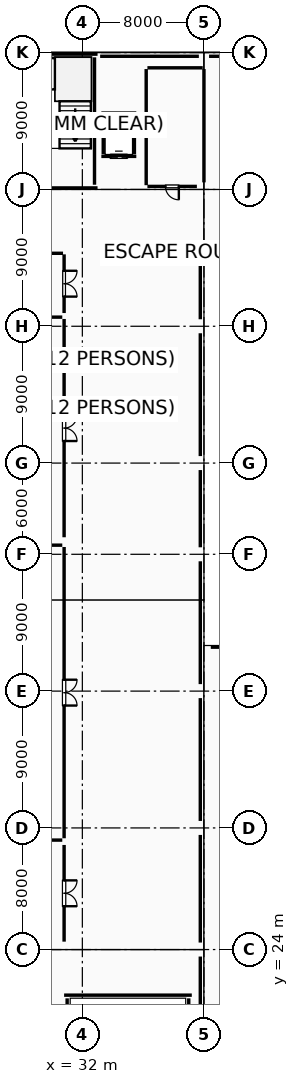
"""IFC4 building model, lengths in metres.
Left out: names, types, materials, properties, quantities, classifications, styles, units other than length and angle.
Written with IfcOpenShell. Run it as: python <this file> out.ifc"""

import sys

from ifc_helpers import new_model, si_unit, direction, frame, frame_2d, origin, origin_2d, place, context, subcontext, project, spatial, rectangle, i_section, extrude, element, fill, save


model = new_model("IFC4")
c1 = context("Model", 3, precision=1e-05, world=origin(), true_north=direction((0.0, 1.0)))
c2 = subcontext(c1, "Body", "Model", "MODEL_VIEW")
j1 = project(units=[si_unit("LENGTHUNIT", "METRE"), si_unit("PLANEANGLEUNIT", "RADIAN")], contexts=[c1])
p1 = place(None, origin())
s1 = spatial("IfcSite", under=j1, at=p1, CompositionType="ELEMENT")
p2 = place(p1, origin())
s2 = spatial("IfcBuilding", under=s1, at=p2, CompositionType="ELEMENT")
p3 = place(p2, frame((0.0, 0.0, 19.8)))
s3 = spatial("IfcBuildingStorey", under=s2, at=p3, CompositionType="ELEMENT", Elevation=19.8)
for number, where, z_axis, x_axis in (
    (1, (32.0, 24.0, 0.0), (0.0, 0.0, 1.0), (1.0, 0.0, 0.0)),
    (2, (32.0, 50.0, 0.0), (0.0, 0.0, 1.0), (1.0, 0.0, 0.0)),
    (3, (32.0, 56.0, 0.0), (0.0, 0.0, 1.0), (1.0, 0.0, 0.0)),
    (4, (32.0, 65.0, 0.0), (0.0, 0.0, 1.0), (1.0, 0.0, 0.0)),
):
    element("IfcColumn", number, at=place(p3, frame(where, z_axis=z_axis, x_axis=x_axis)), inside=s3, PredefinedType="COLUMN", context=c2, shape_type="SweptSolid", body=[
        extrude(rectangle(XDim=0.75, YDim=0.75, at=origin_2d()), origin(), (0.0, 0.0, 1.0), 4.5),
    ])
for number, where, z_axis, x_axis in (
    (5, (40.0, 24.0, 0.0), (0.0, 0.0, 1.0), (1.0, 0.0, 0.0)),
    (6, (40.0, 32.0, 0.0), (0.0, 0.0, 1.0), (1.0, 0.0, 0.0)),
    (7, (40.0, 41.0, 0.0), (0.0, 0.0, 1.0), (1.0, 0.0, 0.0)),
    (8, (40.0, 50.0, 0.0), (0.0, 0.0, 1.0), (1.0, 0.0, 0.0)),
    (9, (40.0, 56.0, 0.0), (0.0, 0.0, 1.0), (1.0, 0.0, 0.0)),
    (10, (40.0, 65.0, 0.0), (0.0, 0.0, 1.0), (1.0, 0.0, 0.0)),
):
    element("IfcColumn", number, at=place(p3, frame(where, z_axis=z_axis, x_axis=x_axis)), inside=s3, PredefinedType="COLUMN", context=c2, shape_type="SweptSolid", body=[
        extrude(rectangle(XDim=0.9, YDim=0.9, at=origin_2d()), origin(), (0.0, 0.0, 1.0), 4.5),
    ])
p4 = place(p3, frame((40.0, 74.0, 0.0), z_axis=(0.0, 0.0, 1.0), x_axis=(1.0, 0.0, 0.0)))
e11 = element("IfcColumn", 11, at=p4, inside=s3, PredefinedType="COLUMN", context=c2, shape_type="SweptSolid", body=[
    extrude(rectangle(XDim=0.9, YDim=0.9, at=origin_2d()), origin(), (0.0, 0.0, 1.0), 4.46),
])
p5 = place(p3, frame((40.0, 83.0, 0.0), z_axis=(0.0, 0.0, 1.0), x_axis=(1.0, 0.0, 0.0)))
e12 = element("IfcColumn", 12, at=p5, inside=s3, PredefinedType="COLUMN", context=c2, shape_type="SweptSolid", body=[
    extrude(rectangle(XDim=0.65, YDim=0.65, at=origin_2d()), origin(), (0.0, 0.0, 1.0), 4.5),
])
p6 = place(p3, frame((30.28, 79.88, 0.0), z_axis=(0.0, 0.0, 1.0), x_axis=(1.0, 0.0, 0.0)))
e13 = element("IfcColumn", 13, at=p6, inside=s3, PredefinedType="COLUMN", context=c2, shape_type="SweptSolid", body=[
    extrude(i_section(OverallWidth=0.25, OverallDepth=0.35, WebThickness=0.01, FlangeThickness=0.012, FilletRadius=0.012, at=origin_2d()), origin(), (0.0, 0.0, 1.0), 4.46),
])
p7 = place(p3, frame((33.17, 82.76, 0.0), z_axis=(0.0, 0.0, 1.0), x_axis=(1.0, 0.0, 0.0)))
e14 = element("IfcWall", 14, at=p7, inside=s3, PredefinedType="PARAPET", context=c2, shape_type="SweptSolid", body=[
    extrude(rectangle(XDim=6.495, YDim=0.18, at=frame_2d((3.248, 0.0))), origin(), (0.0, 0.0, 1.0), 0.88),
])
p8 = place(p3, frame((40.335, 82.76, 0.0), z_axis=(0.0, 0.0, 1.0), x_axis=(1.0, 0.0, 0.0)))
e15 = element("IfcWall", 15, at=p8, inside=s3, PredefinedType="PARAPET", context=c2, shape_type="SweptSolid", body=[
    extrude(rectangle(XDim=7.33, YDim=0.18, at=frame_2d((3.665, 0.0))), origin(), (0.0, 0.0, 1.0), 0.88),
])
p9 = place(p3, frame((39.76, 69.88, 0.0), z_axis=(0.0, 0.0, 1.0), x_axis=(0.0, -1.0, 0.0)))
e16 = element("IfcWall", 16, at=p9, inside=s3, PredefinedType="PARAPET", context=c2, shape_type="SweptSolid", body=[
    extrude(rectangle(XDim=4.42, YDim=0.18, at=frame_2d((2.21, 0.0))), origin(), (0.0, 0.0, 1.0), 0.88),
])
p10 = place(p3, frame((39.76, 64.54, 0.0), z_axis=(0.0, 0.0, 1.0), x_axis=(0.0, -1.0, 0.0)))
e17 = element("IfcWall", 17, at=p10, inside=s3, PredefinedType="PARAPET", context=c2, shape_type="SweptSolid", body=[
    extrude(rectangle(XDim=8.08, YDim=0.18, at=frame_2d((4.04, 0.0))), origin(), (0.0, 0.0, 1.0), 0.88),
])
p11 = place(p3, frame((39.76, 55.54, 0.0), z_axis=(0.0, 0.0, 1.0), x_axis=(0.0, -1.0, 0.0)))
e18 = element("IfcWall", 18, at=p11, inside=s3, PredefinedType="PARAPET", context=c2, shape_type="SweptSolid", body=[
    extrude(rectangle(XDim=5.08, YDim=0.18, at=frame_2d((2.54, 0.0))), origin(), (0.0, 0.0, 1.0), 0.88),
])
for number, where, z_axis, x_axis in (
    (19, (39.76, 49.54, 0.0), (0.0, 0.0, 1.0), (0.0, -1.0, 0.0)),
    (20, (39.76, 40.54, 0.0), (0.0, 0.0, 1.0), (0.0, -1.0, 0.0)),
):
    element("IfcWall", number, at=place(p3, frame(where, z_axis=z_axis, x_axis=x_axis)), inside=s3, PredefinedType="PARAPET", context=c2, shape_type="SweptSolid", body=[
        extrude(rectangle(XDim=8.08, YDim=0.18, at=frame_2d((4.04, 0.0))), origin(), (0.0, 0.0, 1.0), 0.88),
    ])
for number, where, z_axis, x_axis in (
    (21, (39.76, 31.54, 0.0), (0.0, 0.0, 1.0), (0.0, -1.0, 0.0)),
    (22, (39.76, 23.54, 0.0), (0.0, 0.0, 1.0), (0.0, -1.0, 0.0)),
):
    element("IfcWall", number, at=place(p3, frame(where, z_axis=z_axis, x_axis=x_axis)), inside=s3, PredefinedType="PARAPET", context=c2, shape_type="SweptSolid", body=[
        extrude(rectangle(XDim=7.08, YDim=0.18, at=frame_2d((3.54, 0.0))), origin(), (0.0, 0.0, 1.0), 0.88),
    ])
p12 = place(p3, frame((40.45, 43.89, 0.0), z_axis=(0.0, 0.0, 1.0), x_axis=(1.0, 0.0, 0.0)))
e23 = element("IfcWall", 23, at=p12, inside=s3, PredefinedType="PARAPET", context=c2, shape_type="SweptSolid", body=[
    extrude(rectangle(XDim=23.1, YDim=0.18, at=frame_2d((11.55, 0.0))), origin(), (0.0, 0.0, 1.0), 1.15),
])
p13 = place(p3, frame((39.2, 21.0, 0.0), z_axis=(0.0, 0.0, 1.0), x_axis=(-1.0, 0.0, 0.0)))
e24 = element("IfcWall", 24, at=p13, inside=s3, PredefinedType="SHEAR", context=c2, shape_type="SweptSolid", body=[
    extrude(rectangle(XDim=8.4, YDim=0.4, at=frame_2d((4.2, 0.0))), origin(), (0.0, 0.0, 1.0), 4.28),
])
for number, where, z_axis, x_axis in (
    (25, (39.0, 12.41, 0.0), (0.0, 0.0, 1.0), (0.0, 1.0, 0.0)),
    (26, (31.0, 20.79, 0.0), (0.0, 0.0, 1.0), (0.0, -1.0, 0.0)),
):
    element("IfcWall", number, at=place(p3, frame(where, z_axis=z_axis, x_axis=x_axis)), inside=s3, PredefinedType="SHEAR", context=c2, shape_type="SweptSolid", body=[
        extrude(rectangle(XDim=8.38, YDim=0.4, at=frame_2d((4.19, 0.0))), origin(), (0.0, 0.0, 1.0), 4.28),
    ])
p14 = place(p3, frame((24.374, 74.1, 0.0), z_axis=(0.0, 0.0, 1.0), x_axis=(1.0, 0.0, 0.0)))
e27 = element("IfcWall", 27, at=p14, inside=s3, PredefinedType="SHEAR", context=c2, shape_type="SweptSolid", body=[
    extrude(rectangle(XDim=8.626, YDim=0.4, at=frame_2d((4.313, 0.0))), origin(), (0.0, 0.0, 1.0), 4.25),
])
p15 = place(p14, frame((3.776, 0.0, 0.0)))
e28 = element("IfcOpeningElement", 28, at=p15, cuts=e27, PredefinedType="OPENING", context=c2, shape_type="SweptSolid", body=[
    extrude(rectangle(XDim=1.3, YDim=2.15, at=frame_2d((0.65, 1.075))), frame((0.0, 0.21, 0.0), z_axis=(0.0, -1.0, 0.0), x_axis=(1.0, 0.0, 0.0)), (0.0, 0.0, 1.0), 0.42),
])
p16 = place(p3, frame((33.0, 82.9, 0.0), z_axis=(0.0, 0.0, 1.0), x_axis=(-1.0, 0.0, 0.0)))
e29 = element("IfcWall", 29, at=p16, inside=s3, PredefinedType="SHEAR", context=c2, shape_type="SweptSolid", body=[
    extrude(rectangle(XDim=8.676, YDim=0.4, at=frame_2d((4.338, 0.0))), origin(), (0.0, 0.0, 1.0), 4.25),
])
p17 = place(p3, frame((32.8, 74.31, 0.0), z_axis=(0.0, 0.0, 1.0), x_axis=(0.0, 1.0, 0.0)))
e30 = element("IfcWall", 30, at=p17, inside=s3, PredefinedType="SHEAR", context=c2, shape_type="SweptSolid", body=[
    extrude(rectangle(XDim=8.38, YDim=0.4, at=frame_2d((4.19, 0.0))), origin(), (0.0, 0.0, 1.0), 4.25),
])
p18 = place(p3, frame((33.25, 76.175, 0.0), z_axis=(0.0, 0.0, 1.0), x_axis=(1.0, 0.0, 0.0)))
e31 = element("IfcWall", 31, at=p18, inside=s3, PredefinedType="STANDARD", context=c2, shape_type="SweptSolid", body=[
    extrude(rectangle(XDim=2.3, YDim=0.25, at=frame_2d((1.15, 0.0))), origin(), (0.0, 0.0, 1.0), 4.24),
])
p19 = place(p18, frame((0.6, 0.0, 0.0)))
e32 = element("IfcOpeningElement", 32, at=p19, cuts=e31, PredefinedType="OPENING", context=c2, shape_type="SweptSolid", body=[
    extrude(rectangle(XDim=1.1, YDim=2.15, at=frame_2d((0.55, 1.075))), frame((0.0, 0.135, 0.0), z_axis=(0.0, -1.0, 0.0), x_axis=(1.0, 0.0, 0.0)), (0.0, 0.0, 1.0), 0.27),
])
p20 = place(p3, frame((35.55, 79.025, 0.0), z_axis=(0.0, 0.0, 1.0), x_axis=(-1.0, 0.0, 0.0)))
e33 = element("IfcWall", 33, at=p20, inside=s3, PredefinedType="STANDARD", context=c2, shape_type="SweptSolid", body=[
    extrude(rectangle(XDim=2.3, YDim=0.25, at=frame_2d((1.15, 0.0))), origin(), (0.0, 0.0, 1.0), 4.24),
])
for number, where, z_axis, x_axis in (
    (34, (35.425, 76.31, 0.0), (0.0, 0.0, 1.0), (0.0, 1.0, 0.0)),
    (35, (33.375, 78.89, 0.0), (0.0, 0.0, 1.0), (0.0, -1.0, 0.0)),
):
    element("IfcWall", number, at=place(p3, frame(where, z_axis=z_axis, x_axis=x_axis)), inside=s3, PredefinedType="STANDARD", context=c2, shape_type="SweptSolid", body=[
        extrude(rectangle(XDim=2.58, YDim=0.25, at=frame_2d((1.29, 0.0))), origin(), (0.0, 0.0, 1.0), 4.24),
    ])
p21 = place(p3, frame((16.344, 50.6, 0.0), z_axis=(0.0, 0.0, 1.0), x_axis=(1.0, 0.0, 0.0)))
e36 = element("IfcWall", 36, at=p21, inside=s3, PredefinedType="PARTITIONING", context=c2, shape_type="SweptSolid", body=[
    extrude(rectangle(XDim=14.336, YDim=0.2, at=frame_2d((7.168, 0.0))), origin(), (0.0, 0.0, 1.0), 4.5),
])
p22 = place(p3, frame((30.8, 50.48, 0.0), z_axis=(0.0, 0.0, 1.0), x_axis=(0.0, -1.0, 0.0)))
e37 = element("IfcWall", 37, at=p22, inside=s3, PredefinedType="PARTITIONING", context=c2, shape_type="SweptSolid", body=[
    extrude(rectangle(XDim=19.16, YDim=0.2, at=frame_2d((9.58, 0.0))), origin(), (0.0, 0.0, 1.0), 4.5),
])
p23 = place(p22, frame((8.73, 0.0, 0.0)))
e38 = element("IfcOpeningElement", 38, at=p23, cuts=e37, PredefinedType="OPENING", context=c2, shape_type="SweptSolid", body=[
    extrude(rectangle(XDim=1.7, YDim=2.25, at=frame_2d((0.85, 1.125))), frame((0.0, 0.11, 0.0), z_axis=(0.0, -1.0, 0.0), x_axis=(1.0, 0.0, 0.0)), (0.0, 0.0, 1.0), 0.22),
])
p24 = place(p3, frame((30.68, 31.2, 0.0), z_axis=(0.0, 0.0, 1.0), x_axis=(-1.0, 0.0, 0.0)))
e39 = element("IfcWall", 39, at=p24, inside=s3, PredefinedType="PARTITIONING", context=c2, shape_type="SweptSolid", body=[
    extrude(rectangle(XDim=14.336, YDim=0.2, at=frame_2d((7.168, 0.0))), origin(), (0.0, 0.0, 1.0), 4.5),
])
p25 = place(p24, frame((6.23, 0.0, 0.0)))
e40 = element("IfcOpeningElement", 40, at=p25, cuts=e39, PredefinedType="OPENING", context=c2, shape_type="SweptSolid", body=[
    extrude(rectangle(XDim=1.7, YDim=2.25, at=frame_2d((0.85, 1.125))), frame((0.0, 0.11, 0.0), z_axis=(0.0, -1.0, 0.0), x_axis=(1.0, 0.0, 0.0)), (0.0, 0.0, 1.0), 0.22),
])
p26 = place(p3, frame((16.344, 65.6, 0.0), z_axis=(0.0, 0.0, 1.0), x_axis=(1.0, 0.0, 0.0)))
e41 = element("IfcWall", 41, at=p26, inside=s3, PredefinedType="PARTITIONING", context=c2, shape_type="SweptSolid", body=[
    extrude(rectangle(XDim=14.336, YDim=0.2, at=frame_2d((7.168, 0.0))), origin(), (0.0, 0.0, 1.0), 4.24),
])
p27 = place(p26, frame((4.642, 0.0, 0.0)))
e42 = element("IfcOpeningElement", 42, at=p27, cuts=e41, PredefinedType="OPENING", context=c2, shape_type="SweptSolid", body=[
    extrude(rectangle(XDim=1.4, YDim=2.15, at=frame_2d((0.7, 1.075))), frame((0.0, 0.11, 0.0), z_axis=(0.0, -1.0, 0.0), x_axis=(1.0, 0.0, 0.0)), (0.0, 0.0, 1.0), 0.22),
])
p28 = place(p26, frame((8.275, 0.0, 0.0)))
e43 = element("IfcOpeningElement", 43, at=p28, cuts=e41, PredefinedType="OPENING", context=c2, shape_type="SweptSolid", body=[
    extrude(rectangle(XDim=1.7, YDim=2.25, at=frame_2d((0.85, 1.125))), frame((0.0, 0.11, 0.0), z_axis=(0.0, -1.0, 0.0), x_axis=(1.0, 0.0, 0.0)), (0.0, 0.0, 1.0), 0.22),
])
p29 = place(p3, frame((30.8, 65.48, 0.0), z_axis=(0.0, 0.0, 1.0), x_axis=(0.0, -1.0, 0.0)))
e44 = element("IfcWall", 44, at=p29, inside=s3, PredefinedType="PARTITIONING", context=c2, shape_type="SweptSolid", body=[
    extrude(rectangle(XDim=14.36, YDim=0.2, at=frame_2d((7.18, 0.0))), origin(), (0.0, 0.0, 1.0), 4.24),
])
p30 = place(p29, frame((6.33, 0.0, 0.0)))
e45 = element("IfcOpeningElement", 45, at=p30, cuts=e44, PredefinedType="OPENING", context=c2, shape_type="SweptSolid", body=[
    extrude(rectangle(XDim=1.7, YDim=2.25, at=frame_2d((0.85, 1.125))), frame((0.0, 0.11, 0.0), z_axis=(0.0, -1.0, 0.0), x_axis=(1.0, 0.0, 0.0)), (0.0, 0.0, 1.0), 0.22),
])
p31 = place(p3, frame((23.67, 69.8, 0.0), z_axis=(0.0, 0.0, 1.0), x_axis=(1.0, 0.0, 0.0)))
e46 = element("IfcWall", 46, at=p31, inside=s3, PredefinedType="PARTITIONING", context=c2, shape_type="SweptSolid", body=[
    extrude(rectangle(XDim=7.06, YDim=0.1, at=frame_2d((3.53, 0.0))), origin(), (0.0, 0.0, 1.0), 4.24),
])
p32 = place(p3, frame((30.8, 69.73, 0.0), z_axis=(0.0, 0.0, 1.0), x_axis=(0.0, -1.0, 0.0)))
e47 = element("IfcWall", 47, at=p32, inside=s3, PredefinedType="PARTITIONING", context=c2, shape_type="SweptSolid", body=[
    extrude(rectangle(XDim=3.86, YDim=0.1, at=frame_2d((1.93, 0.0))), origin(), (0.0, 0.0, 1.0), 4.24),
])
p33 = place(p32, frame((1.08, 0.0, 0.0)))
e48 = element("IfcOpeningElement", 48, at=p33, cuts=e47, PredefinedType="OPENING", context=c2, shape_type="SweptSolid", body=[
    extrude(rectangle(XDim=1.7, YDim=2.25, at=frame_2d((0.85, 1.125))), frame((0.0, 0.06, 0.0), z_axis=(0.0, -1.0, 0.0), x_axis=(1.0, 0.0, 0.0)), (0.0, 0.0, 1.0), 0.12),
])
p34 = place(p3, frame((30.8, 30.88, 0.0), z_axis=(0.0, 0.0, 1.0), x_axis=(0.0, -1.0, 0.0)))
e49 = element("IfcWall", 49, at=p34, inside=s3, PredefinedType="PARTITIONING", context=c2, shape_type="SweptSolid", body=[
    extrude(rectangle(XDim=6.36, YDim=0.2, at=frame_2d((3.18, 0.0))), origin(), (0.0, 0.0, 1.0), 4.5),
])
p35 = place(p34, frame((2.33, 0.0, 0.0)))
e50 = element("IfcOpeningElement", 50, at=p35, cuts=e49, PredefinedType="OPENING", context=c2, shape_type="SweptSolid", body=[
    extrude(rectangle(XDim=1.7, YDim=2.25, at=frame_2d((0.85, 1.125))), frame((0.0, 0.11, 0.0), z_axis=(0.0, -1.0, 0.0), x_axis=(1.0, 0.0, 0.0)), (0.0, 0.0, 1.0), 0.22),
])
p36 = place(p3, frame((40.0, 81.92, 0.0), z_axis=(0.0, 0.0, 1.0), x_axis=(0.0, -1.0, 0.0)))
e51 = element("IfcWall", 51, at=p36, inside=s3, PredefinedType="PARTITIONING", context=c2, shape_type="SweptSolid", body=[
    extrude(rectangle(XDim=7.455, YDim=0.12, at=frame_2d((3.728, 0.0))), origin(), (0.0, 0.0, 1.0), 3.88),
])
p37 = place(p3, frame((39.535, 74.2, 0.0), z_axis=(0.0, 0.0, 1.0), x_axis=(-1.0, 0.0, 0.0)))
e52 = element("IfcWall", 52, at=p37, inside=s3, PredefinedType="PARTITIONING", context=c2, shape_type="SweptSolid", body=[
    extrude(rectangle(XDim=3.255, YDim=0.12, at=frame_2d((1.627, 0.0))), origin(), (0.0, 0.0, 1.0), 4.24),
])
p38 = place(p37, frame((1.187, 0.0, 0.0)))
e53 = element("IfcOpeningElement", 53, at=p38, cuts=e52, PredefinedType="OPENING", context=c2, shape_type="SweptSolid", body=[
    extrude(rectangle(XDim=0.88, YDim=2.1, at=frame_2d((0.44, 1.05))), frame((0.0, 0.07, 0.0), z_axis=(0.0, -1.0, 0.0), x_axis=(1.0, 0.0, 0.0)), (0.0, 0.0, 1.0), 0.14),
])
p39 = place(p3, frame((36.2, 74.28, 0.0), z_axis=(0.0, 0.0, 1.0), x_axis=(0.0, 1.0, 0.0)))
e54 = element("IfcWall", 54, at=p39, inside=s3, PredefinedType="PARTITIONING", context=c2, shape_type="SweptSolid", body=[
    extrude(rectangle(XDim=7.64, YDim=0.12, at=frame_2d((3.82, 0.0))), origin(), (0.0, 0.0, 1.0), 4.24),
])
p40 = place(p3, frame((36.28, 82.0, 0.0), z_axis=(0.0, 0.0, 1.0), x_axis=(1.0, 0.0, 0.0)))
e55 = element("IfcWall", 55, at=p40, inside=s3, PredefinedType="PARTITIONING", context=c2, shape_type="SweptSolid", body=[
    extrude(rectangle(XDim=3.64, YDim=0.12, at=frame_2d((1.82, 0.0))), origin(), (0.0, 0.0, 1.0), 4.24),
])
p41 = place(p19, origin())
e56 = element("IfcDoor", 56, at=p41, inside=s3, OperationType="DOUBLE_DOOR_SLIDING", PredefinedType="DOOR", context=c2, shape_type="SweptSolid", body=[
    extrude(rectangle(XDim=1.1, YDim=2.15, at=frame_2d((0.55, 1.075))), frame((0.0, 0.025, 0.0), z_axis=(0.0, -1.0, 0.0), x_axis=(1.0, 0.0, 0.0)), (0.0, 0.0, 1.0), 0.05),
])
fill(e32, e56)
p42 = place(p23, origin())
e57 = element("IfcDoor", 57, at=p42, inside=s3, OperationType="DOUBLE_DOOR_SINGLE_SWING", PredefinedType="DOOR", context=c2, shape_type="SweptSolid", body=[
    extrude(rectangle(XDim=1.7, YDim=2.25, at=frame_2d((0.85, 1.125))), frame((0.0, 0.025, 0.0), z_axis=(0.0, -1.0, 0.0), x_axis=(1.0, 0.0, 0.0)), (0.0, 0.0, 1.0), 0.05),
])
fill(e38, e57)
p43 = place(p30, origin())
e58 = element("IfcDoor", 58, at=p43, inside=s3, OperationType="DOUBLE_DOOR_SINGLE_SWING", PredefinedType="DOOR", context=c2, shape_type="SweptSolid", body=[
    extrude(rectangle(XDim=1.7, YDim=2.25, at=frame_2d((0.85, 1.125))), frame((0.0, 0.025, 0.0), z_axis=(0.0, -1.0, 0.0), x_axis=(1.0, 0.0, 0.0)), (0.0, 0.0, 1.0), 0.05),
])
fill(e45, e58)
p44 = place(p33, origin())
e59 = element("IfcDoor", 59, at=p44, inside=s3, OperationType="DOUBLE_DOOR_SINGLE_SWING", PredefinedType="DOOR", context=c2, shape_type="SweptSolid", body=[
    extrude(rectangle(XDim=1.7, YDim=2.25, at=frame_2d((0.85, 1.125))), frame((0.0, 0.025, 0.0), z_axis=(0.0, -1.0, 0.0), x_axis=(1.0, 0.0, 0.0)), (0.0, 0.0, 1.0), 0.05),
])
fill(e48, e59)
p45 = place(p35, origin())
e60 = element("IfcDoor", 60, at=p45, inside=s3, OperationType="DOUBLE_DOOR_SINGLE_SWING", PredefinedType="DOOR", context=c2, shape_type="SweptSolid", body=[
    extrude(rectangle(XDim=1.7, YDim=2.25, at=frame_2d((0.85, 1.125))), frame((0.0, 0.025, 0.0), z_axis=(0.0, -1.0, 0.0), x_axis=(1.0, 0.0, 0.0)), (0.0, 0.0, 1.0), 0.05),
])
fill(e50, e60)
p46 = place(p38, origin())
e61 = element("IfcDoor", 61, at=p46, inside=s3, OperationType="SINGLE_SWING_LEFT", PredefinedType="DOOR", context=c2, shape_type="SweptSolid", body=[
    extrude(rectangle(XDim=0.88, YDim=2.1, at=frame_2d((0.44, 1.05))), frame((0.0, 0.025, 0.0), z_axis=(0.0, -1.0, 0.0), x_axis=(1.0, 0.0, 0.0)), (0.0, 0.0, 1.0), 0.05),
])
fill(e53, e61)
save(model, sys.argv[1])
